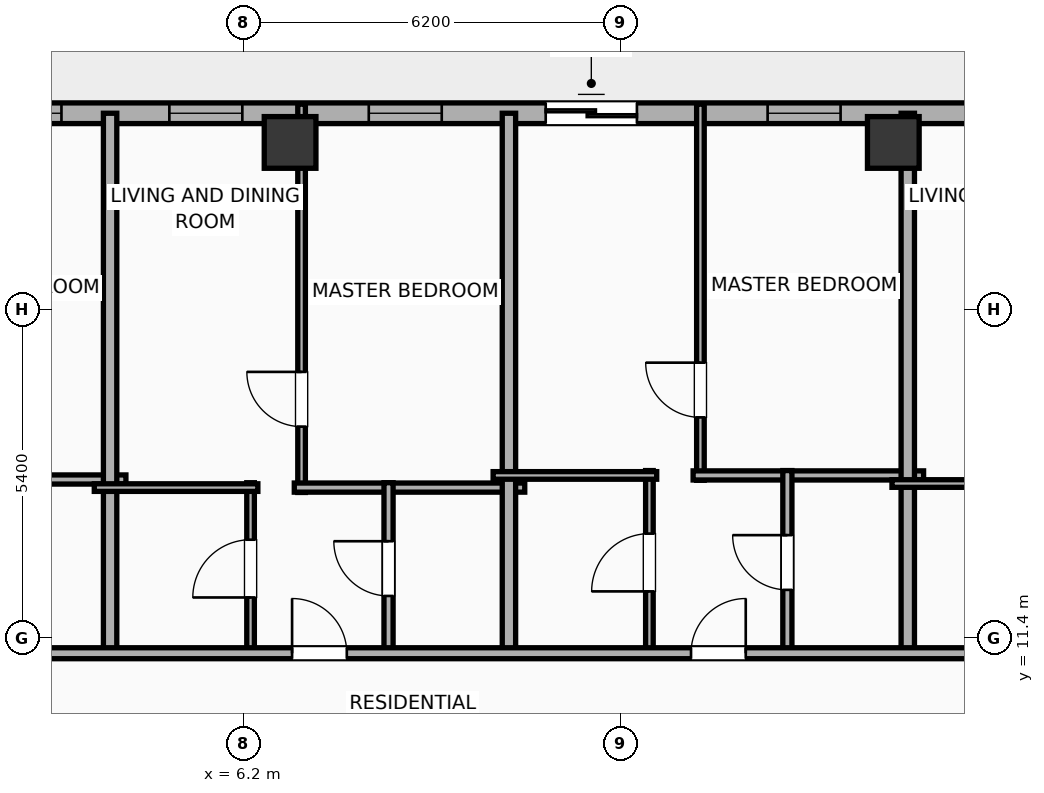
"""IFC4 building model, lengths in metres.
Left out: names, types, materials, properties, quantities, classifications, styles, units other than length and angle.
Written with IfcOpenShell. Run it as: python <this file> out.ifc"""

import sys

from ifc_helpers import new_model, si_unit, direction, frame, frame_2d, origin, origin_2d, place, context, subcontext, project, spatial, rectangle, hollow_rectangle, extrude, element, fill, save


model = new_model("IFC4")
c1 = context("Model", 3, precision=1e-05, world=origin(), true_north=direction((0.0, 1.0)))
c2 = subcontext(c1, "Body", "Model", "MODEL_VIEW")
j1 = project(units=[si_unit("LENGTHUNIT", "METRE"), si_unit("PLANEANGLEUNIT", "RADIAN")], contexts=[c1])
p1 = place(None, origin())
s1 = spatial("IfcSite", under=j1, at=p1, CompositionType="ELEMENT")
p2 = place(p1, origin())
s2 = spatial("IfcBuilding", under=s1, at=p2, CompositionType="ELEMENT")
p3 = place(p2, frame((0.0, 0.0, 231.4)))
s3 = spatial("IfcBuildingStorey", under=s2, at=p3, CompositionType="ELEMENT", Elevation=231.4)
for number, where, z_axis, x_axis in (
    (1, (16.88, 19.55, 0.0), (0.0, 0.0, 1.0), (1.0, 0.0, 0.0)),
    (2, (6.96, 19.55, 0.0), (0.0, 0.0, 1.0), (1.0, 0.0, 0.0)),
):
    element("IfcColumn", number, at=place(p3, frame(where, z_axis=z_axis, x_axis=x_axis)), inside=s3, PredefinedType="COLUMN", context=c2, shape_type="SweptSolid", body=[
        extrude(hollow_rectangle(XDim=0.85, YDim=0.85, WallThickness=0.028, at=origin_2d()), origin(), (0.0, 0.0, 1.0), 3.9),
    ])
p4 = place(p3, frame((-22.783, 20.03, 0.0), z_axis=(0.0, 0.0, 1.0), x_axis=(1.0, 0.0, 0.0)))
e3 = element("IfcWall", 3, at=p4, inside=s3, PredefinedType="ELEMENTEDWALL", context=c2, shape_type="SweptSolid", body=[
    extrude(rectangle(XDim=49.566, YDim=0.34, at=frame_2d((24.783, 0.0))), origin(), (0.0, 0.0, 1.0), 3.65),
])
p5 = place(p4, frame((14.12, 0.0, 0.0)))
e4 = element("IfcOpeningElement", 4, at=p5, cuts=e3, PredefinedType="OPENING", context=c2, shape_type="SweptSolid", body=[
    extrude(rectangle(XDim=1.5, YDim=2.05, at=frame_2d((0.75, 1.025))), frame((0.0, 0.18, 0.0), z_axis=(0.0, -1.0, 0.0), x_axis=(1.0, 0.0, 0.0)), (0.0, 0.0, 1.0), 0.36),
])
p6 = place(p4, frame((6.211, 0.0, 0.75)))
e5 = element("IfcOpeningElement", 5, at=p6, cuts=e3, PredefinedType="OPENING", context=c2, shape_type="SweptSolid", body=[
    extrude(rectangle(XDim=2.4, YDim=2.1, at=frame_2d((1.2, 1.05))), frame((0.0, 0.18, 0.0), z_axis=(0.0, -1.0, 0.0), x_axis=(1.0, 0.0, 0.0)), (0.0, 0.0, 1.0), 0.36),
])
p7 = place(p4, frame((23.583, 0.0, 0.75)))
e6 = element("IfcOpeningElement", 6, at=p7, cuts=e3, PredefinedType="OPENING", context=c2, shape_type="SweptSolid", body=[
    extrude(rectangle(XDim=2.4, YDim=2.1, at=frame_2d((1.2, 1.05))), frame((0.0, 0.18, 0.0), z_axis=(0.0, -1.0, 0.0), x_axis=(1.0, 0.0, 0.0)), (0.0, 0.0, 1.0), 0.36),
])
p8 = place(p4, frame((33.947, 0.0, 0.0)))
e7 = element("IfcOpeningElement", 7, at=p8, cuts=e3, PredefinedType="OPENING", context=c2, shape_type="SweptSolid", body=[
    extrude(rectangle(XDim=1.5, YDim=2.05, at=frame_2d((0.75, 1.025))), frame((0.0, 0.18, 0.0), z_axis=(0.0, -1.0, 0.0), x_axis=(1.0, 0.0, 0.0)), (0.0, 0.0, 1.0), 0.36),
])
p9 = place(p4, frame((2.36, 0.0, 0.75)))
e8 = element("IfcOpeningElement", 8, at=p9, cuts=e3, PredefinedType="OPENING", context=c2, shape_type="SweptSolid", body=[
    extrude(rectangle(XDim=1.2, YDim=2.05, at=frame_2d((0.6, 1.025))), frame((0.0, 0.18, 0.0), z_axis=(0.0, -1.0, 0.0), x_axis=(1.0, 0.0, 0.0)), (0.0, 0.0, 1.0), 0.36),
])
p10 = place(p4, frame((10.598, 0.0, 0.75)))
e9 = element("IfcOpeningElement", 9, at=p10, cuts=e3, PredefinedType="OPENING", context=c2, shape_type="SweptSolid", body=[
    extrude(rectangle(XDim=1.2, YDim=2.05, at=frame_2d((0.6, 1.025))), frame((0.0, 0.18, 0.0), z_axis=(0.0, -1.0, 0.0), x_axis=(1.0, 0.0, 0.0)), (0.0, 0.0, 1.0), 0.36),
])
p11 = place(p4, frame((17.478, 0.0, 0.75)))
e10 = element("IfcOpeningElement", 10, at=p11, cuts=e3, PredefinedType="OPENING", context=c2, shape_type="SweptSolid", body=[
    extrude(rectangle(XDim=1.2, YDim=2.05, at=frame_2d((0.6, 1.025))), frame((0.0, 0.18, 0.0), z_axis=(0.0, -1.0, 0.0), x_axis=(1.0, 0.0, 0.0)), (0.0, 0.0, 1.0), 0.36),
])
p12 = place(p4, frame((20.978, 0.0, 0.75)))
e11 = element("IfcOpeningElement", 11, at=p12, cuts=e3, PredefinedType="OPENING", context=c2, shape_type="SweptSolid", body=[
    extrude(rectangle(XDim=1.2, YDim=2.05, at=frame_2d((0.6, 1.025))), frame((0.0, 0.18, 0.0), z_axis=(0.0, -1.0, 0.0), x_axis=(1.0, 0.0, 0.0)), (0.0, 0.0, 1.0), 0.36),
])
p13 = place(p4, frame((27.758, 0.0, 0.75)))
e12 = element("IfcOpeningElement", 12, at=p13, cuts=e3, PredefinedType="OPENING", context=c2, shape_type="SweptSolid", body=[
    extrude(rectangle(XDim=1.2, YDim=2.05, at=frame_2d((0.6, 1.025))), frame((0.0, 0.18, 0.0), z_axis=(0.0, -1.0, 0.0), x_axis=(1.0, 0.0, 0.0)), (0.0, 0.0, 1.0), 0.36),
])
p14 = place(p4, frame((31.037, 0.0, 0.75)))
e13 = element("IfcOpeningElement", 13, at=p14, cuts=e3, PredefinedType="OPENING", context=c2, shape_type="SweptSolid", body=[
    extrude(rectangle(XDim=1.2, YDim=2.05, at=frame_2d((0.6, 1.025))), frame((0.0, 0.18, 0.0), z_axis=(0.0, -1.0, 0.0), x_axis=(1.0, 0.0, 0.0)), (0.0, 0.0, 1.0), 0.36),
])
p15 = place(p4, frame((37.596, 0.0, 0.75)))
e14 = element("IfcOpeningElement", 14, at=p15, cuts=e3, PredefinedType="OPENING", context=c2, shape_type="SweptSolid", body=[
    extrude(rectangle(XDim=1.2, YDim=2.05, at=frame_2d((0.6, 1.025))), frame((0.0, 0.18, 0.0), z_axis=(0.0, -1.0, 0.0), x_axis=(1.0, 0.0, 0.0)), (0.0, 0.0, 1.0), 0.36),
])
p16 = place(p4, frame((40.876, 0.0, 0.75)))
e15 = element("IfcOpeningElement", 15, at=p16, cuts=e3, PredefinedType="OPENING", context=c2, shape_type="SweptSolid", body=[
    extrude(rectangle(XDim=1.2, YDim=2.05, at=frame_2d((0.6, 1.025))), frame((0.0, 0.18, 0.0), z_axis=(0.0, -1.0, 0.0), x_axis=(1.0, 0.0, 0.0)), (0.0, 0.0, 1.0), 0.36),
])
p17 = place(p4, frame((44.156, 0.0, 0.75)))
e16 = element("IfcOpeningElement", 16, at=p17, cuts=e3, PredefinedType="OPENING", context=c2, shape_type="SweptSolid", body=[
    extrude(rectangle(XDim=1.2, YDim=2.05, at=frame_2d((0.6, 1.025))), frame((0.0, 0.18, 0.0), z_axis=(0.0, -1.0, 0.0), x_axis=(1.0, 0.0, 0.0)), (0.0, 0.0, 1.0), 0.36),
])
p18 = place(p4, frame((46.969, 0.0, 0.75)))
e17 = element("IfcOpeningElement", 17, at=p18, cuts=e3, PredefinedType="OPENING", context=c2, shape_type="SweptSolid", body=[
    extrude(rectangle(XDim=1.2, YDim=2.05, at=frame_2d((0.6, 1.025))), frame((0.0, 0.18, 0.0), z_axis=(0.0, -1.0, 0.0), x_axis=(1.0, 0.0, 0.0)), (0.0, 0.0, 1.0), 0.36),
])
p19 = place(p3, frame((0.47, 14.007, 0.0), z_axis=(0.0, 0.0, 1.0), x_axis=(1.0, 0.0, 0.0)))
e18 = element("IfcWall", 18, at=p19, inside=s3, PredefinedType="PLUMBINGWALL", context=c2, shape_type="SweptSolid", body=[
    extrude(rectangle(XDim=3.79, YDim=0.15, at=frame_2d((1.895, 0.0))), origin(), (0.0, 0.0, 1.0), 3.65),
])
p20 = place(p3, frame((4.0, 11.07, 0.0), z_axis=(0.0, 0.0, 1.0), x_axis=(0.0, 1.0, 0.0)))
e19 = element("IfcWall", 19, at=p20, inside=s3, PredefinedType="PARTITIONING", context=c2, shape_type="SweptSolid", body=[
    extrude(rectangle(XDim=8.96, YDim=0.22, at=frame_2d((4.48, 0.0))), origin(), (0.0, 0.0, 1.0), 3.65),
])
p21 = place(p3, frame((7.149, 13.794, 0.0), z_axis=(0.0, 0.0, 1.0), x_axis=(0.0, 1.0, 0.0)))
e20 = element("IfcWall", 20, at=p21, inside=s3, PredefinedType="PARTITIONING", context=c2, shape_type="SweptSolid", body=[
    extrude(rectangle(XDim=6.386, YDim=0.125, at=frame_2d((3.193, 0.0))), origin(), (0.0, 0.0, 1.0), 3.65),
])
p22 = place(p21, frame((1.083, 0.0, 0.0)))
e21 = element("IfcOpeningElement", 21, at=p22, cuts=e20, PredefinedType="OPENING", context=c2, shape_type="SweptSolid", body=[
    extrude(rectangle(XDim=0.9, YDim=2.05, at=frame_2d((0.45, 1.025))), frame((0.0, 0.073, 0.0), z_axis=(0.0, -1.0, 0.0), x_axis=(1.0, 0.0, 0.0)), (0.0, 0.0, 1.0), 0.145),
])
p23 = place(p3, frame((7.029, 13.874, 0.0), z_axis=(0.0, 0.0, 1.0), x_axis=(1.0, 0.0, 0.0)))
e22 = element("IfcWall", 22, at=p23, inside=s3, PredefinedType="PLUMBINGWALL", context=c2, shape_type="SweptSolid", body=[
    extrude(rectangle(XDim=3.79, YDim=0.15, at=frame_2d((1.895, 0.0))), origin(), (0.0, 0.0, 1.0), 3.65),
])
p24 = place(p3, frame((6.31, 11.13, 0.0), z_axis=(0.0, 0.0, 1.0), x_axis=(0.0, 1.0, 0.0)))
e23 = element("IfcWall", 23, at=p24, inside=s3, PredefinedType="PARTITIONING", context=c2, shape_type="SweptSolid", body=[
    extrude(rectangle(XDim=2.824, YDim=0.125, at=frame_2d((1.412, 0.0))), origin(), (0.0, 0.0, 1.0), 3.65),
])
p25 = place(p24, frame((0.937, 0.0, 0.0)))
e24 = element("IfcOpeningElement", 24, at=p25, cuts=e23, PredefinedType="OPENING", context=c2, shape_type="SweptSolid", body=[
    extrude(rectangle(XDim=0.95, YDim=2.05, at=frame_2d((0.475, 1.025))), frame((0.0, 0.073, 0.0), z_axis=(0.0, -1.0, 0.0), x_axis=(1.0, 0.0, 0.0)), (0.0, 0.0, 1.0), 0.145),
])
p26 = place(p3, frame((3.74, 13.874, 0.0), z_axis=(0.0, 0.0, 1.0), x_axis=(1.0, 0.0, 0.0)))
e25 = element("IfcWall", 25, at=p26, inside=s3, PredefinedType="PARTITIONING", context=c2, shape_type="SweptSolid", body=[
    extrude(rectangle(XDim=2.69, YDim=0.125, at=frame_2d((1.345, 0.0))), origin(), (0.0, 0.0, 1.0), 3.65),
])
p27 = place(p3, frame((8.579, 11.13, 0.0), z_axis=(0.0, 0.0, 1.0), x_axis=(0.0, 1.0, 0.0)))
e26 = element("IfcWall", 26, at=p27, inside=s3, PredefinedType="PLUMBINGWALL", context=c2, shape_type="SweptSolid", body=[
    extrude(rectangle(XDim=2.824, YDim=0.15, at=frame_2d((1.412, 0.0))), origin(), (0.0, 0.0, 1.0), 3.65),
])
p28 = place(p27, frame((0.962, 0.0, 0.0)))
e27 = element("IfcOpeningElement", 27, at=p28, cuts=e26, PredefinedType="OPENING", context=c2, shape_type="SweptSolid", body=[
    extrude(rectangle(XDim=0.9, YDim=2.05, at=frame_2d((0.45, 1.025))), frame((0.0, 0.085, 0.0), z_axis=(0.0, -1.0, 0.0), x_axis=(1.0, 0.0, 0.0)), (0.0, 0.0, 1.0), 0.17),
])
p29 = place(p3, frame((10.559, 11.07, 0.0), z_axis=(0.0, 0.0, 1.0), x_axis=(0.0, 1.0, 0.0)))
e28 = element("IfcWall", 28, at=p29, inside=s3, PredefinedType="PARTITIONING", context=c2, shape_type="SweptSolid", body=[
    extrude(rectangle(XDim=8.96, YDim=0.22, at=frame_2d((4.48, 0.0))), origin(), (0.0, 0.0, 1.0), 3.65),
])
p30 = place(p3, frame((13.708, 13.994, 0.0), z_axis=(0.0, 0.0, 1.0), x_axis=(0.0, 1.0, 0.0)))
e29 = element("IfcWall", 29, at=p30, inside=s3, PredefinedType="PARTITIONING", context=c2, shape_type="SweptSolid", body=[
    extrude(rectangle(XDim=6.186, YDim=0.125, at=frame_2d((3.093, 0.0))), origin(), (0.0, 0.0, 1.0), 3.65),
])
p31 = place(p30, frame((1.035, 0.0, 0.0)))
e30 = element("IfcOpeningElement", 30, at=p31, cuts=e29, PredefinedType="OPENING", context=c2, shape_type="SweptSolid", body=[
    extrude(rectangle(XDim=0.9, YDim=2.05, at=frame_2d((0.45, 1.025))), frame((0.0, 0.073, 0.0), z_axis=(0.0, -1.0, 0.0), x_axis=(1.0, 0.0, 0.0)), (0.0, 0.0, 1.0), 0.145),
])
p32 = place(p3, frame((13.588, 14.074, 0.0), z_axis=(0.0, 0.0, 1.0), x_axis=(1.0, 0.0, 0.0)))
e31 = element("IfcWall", 31, at=p32, inside=s3, PredefinedType="PLUMBINGWALL", context=c2, shape_type="SweptSolid", body=[
    extrude(rectangle(XDim=3.79, YDim=0.15, at=frame_2d((1.895, 0.0))), origin(), (0.0, 0.0, 1.0), 3.65),
])
p33 = place(p3, frame((12.869, 11.13, 0.0), z_axis=(0.0, 0.0, 1.0), x_axis=(0.0, 1.0, 0.0)))
e32 = element("IfcWall", 32, at=p33, inside=s3, PredefinedType="PARTITIONING", context=c2, shape_type="SweptSolid", body=[
    extrude(rectangle(XDim=3.024, YDim=0.125, at=frame_2d((1.512, 0.0))), origin(), (0.0, 0.0, 1.0), 3.65),
])
p34 = place(p33, frame((1.037, 0.0, 0.0)))
e33 = element("IfcOpeningElement", 33, at=p34, cuts=e32, PredefinedType="OPENING", context=c2, shape_type="SweptSolid", body=[
    extrude(rectangle(XDim=0.95, YDim=2.05, at=frame_2d((0.475, 1.025))), frame((0.0, 0.073, 0.0), z_axis=(0.0, -1.0, 0.0), x_axis=(1.0, 0.0, 0.0)), (0.0, 0.0, 1.0), 0.145),
])
p35 = place(p3, frame((10.299, 14.074, 0.0), z_axis=(0.0, 0.0, 1.0), x_axis=(1.0, 0.0, 0.0)))
e34 = element("IfcWall", 34, at=p35, inside=s3, PredefinedType="PARTITIONING", context=c2, shape_type="SweptSolid", body=[
    extrude(rectangle(XDim=2.69, YDim=0.125, at=frame_2d((1.345, 0.0))), origin(), (0.0, 0.0, 1.0), 3.65),
])
p36 = place(p3, frame((15.138, 11.13, 0.0), z_axis=(0.0, 0.0, 1.0), x_axis=(0.0, 1.0, 0.0)))
e35 = element("IfcWall", 35, at=p36, inside=s3, PredefinedType="PLUMBINGWALL", context=c2, shape_type="SweptSolid", body=[
    extrude(rectangle(XDim=3.024, YDim=0.15, at=frame_2d((1.512, 0.0))), origin(), (0.0, 0.0, 1.0), 3.65),
])
p37 = place(p36, frame((1.062, 0.0, 0.0)))
e36 = element("IfcOpeningElement", 36, at=p37, cuts=e35, PredefinedType="OPENING", context=c2, shape_type="SweptSolid", body=[
    extrude(rectangle(XDim=0.9, YDim=2.05, at=frame_2d((0.45, 1.025))), frame((0.0, 0.085, 0.0), z_axis=(0.0, -1.0, 0.0), x_axis=(1.0, 0.0, 0.0)), (0.0, 0.0, 1.0), 0.17),
])
p38 = place(p3, frame((17.118, 11.07, 0.0), z_axis=(0.0, 0.0, 1.0), x_axis=(0.0, 1.0, 0.0)))
e37 = element("IfcWall", 37, at=p38, inside=s3, PredefinedType="PARTITIONING", context=c2, shape_type="SweptSolid", body=[
    extrude(rectangle(XDim=8.96, YDim=0.22, at=frame_2d((4.48, 0.0))), origin(), (0.0, 0.0, 1.0), 3.65),
])
p39 = place(p3, frame((16.858, 13.941, 0.0), z_axis=(0.0, 0.0, 1.0), x_axis=(1.0, 0.0, 0.0)))
e38 = element("IfcWall", 38, at=p39, inside=s3, PredefinedType="PARTITIONING", context=c2, shape_type="SweptSolid", body=[
    extrude(rectangle(XDim=2.69, YDim=0.125, at=frame_2d((1.345, 0.0))), origin(), (0.0, 0.0, 1.0), 3.65),
])
p40 = place(p3, frame((-26.23, 11.15, 0.0), z_axis=(0.0, 0.0, 1.0), x_axis=(1.0, 0.0, 0.0)))
e39 = element("IfcWall", 39, at=p40, inside=s3, PredefinedType="PARTITIONING", context=c2, shape_type="SweptSolid", body=[
    extrude(rectangle(XDim=56.46, YDim=0.18, at=frame_2d((28.23, 0.0))), origin(), (0.0, 0.0, 1.0), 3.65),
])
p41 = place(p40, frame((3.614, 0.0, 0.0)))
e40 = element("IfcOpeningElement", 40, at=p41, cuts=e39, PredefinedType="OPENING", context=c2, shape_type="SweptSolid", body=[
    extrude(rectangle(XDim=1.15, YDim=2.05, at=frame_2d((0.575, 1.025))), frame((0.0, 0.1, 0.0), z_axis=(0.0, -1.0, 0.0), x_axis=(1.0, 0.0, 0.0)), (0.0, 0.0, 1.0), 0.2),
])
p42 = place(p40, frame((11.761, 0.0, 0.0)))
e41 = element("IfcOpeningElement", 41, at=p42, cuts=e39, PredefinedType="OPENING", context=c2, shape_type="SweptSolid", body=[
    extrude(rectangle(XDim=1.15, YDim=2.05, at=frame_2d((0.575, 1.025))), frame((0.0, 0.1, 0.0), z_axis=(0.0, -1.0, 0.0), x_axis=(1.0, 0.0, 0.0)), (0.0, 0.0, 1.0), 0.2),
])
p43 = place(p40, frame((19.447, 0.0, 0.0)))
e42 = element("IfcOpeningElement", 42, at=p43, cuts=e39, PredefinedType="OPENING", context=c2, shape_type="SweptSolid", body=[
    extrude(rectangle(XDim=0.9, YDim=2.05, at=frame_2d((0.45, 1.025))), frame((0.0, 0.1, 0.0), z_axis=(0.0, -1.0, 0.0), x_axis=(1.0, 0.0, 0.0)), (0.0, 0.0, 1.0), 0.2),
])
p44 = place(p40, frame((26.448, 0.0, 0.0)))
e43 = element("IfcOpeningElement", 43, at=p44, cuts=e39, PredefinedType="OPENING", context=c2, shape_type="SweptSolid", body=[
    extrude(rectangle(XDim=0.9, YDim=2.05, at=frame_2d((0.45, 1.025))), frame((0.0, 0.1, 0.0), z_axis=(0.0, -1.0, 0.0), x_axis=(1.0, 0.0, 0.0)), (0.0, 0.0, 1.0), 0.2),
])
p45 = place(p40, frame((33.223, 0.0, 0.0)))
e44 = element("IfcOpeningElement", 44, at=p45, cuts=e39, PredefinedType="OPENING", context=c2, shape_type="SweptSolid", body=[
    extrude(rectangle(XDim=0.9, YDim=2.05, at=frame_2d((0.45, 1.025))), frame((0.0, 0.1, 0.0), z_axis=(0.0, -1.0, 0.0), x_axis=(1.0, 0.0, 0.0)), (0.0, 0.0, 1.0), 0.2),
])
p46 = place(p40, frame((39.783, 0.0, 0.0)))
e45 = element("IfcOpeningElement", 45, at=p46, cuts=e39, PredefinedType="OPENING", context=c2, shape_type="SweptSolid", body=[
    extrude(rectangle(XDim=0.9, YDim=2.05, at=frame_2d((0.45, 1.025))), frame((0.0, 0.1, 0.0), z_axis=(0.0, -1.0, 0.0), x_axis=(1.0, 0.0, 0.0)), (0.0, 0.0, 1.0), 0.2),
])
p47 = place(p40, frame((46.344, 0.0, 0.0)))
e46 = element("IfcOpeningElement", 46, at=p47, cuts=e39, PredefinedType="OPENING", context=c2, shape_type="SweptSolid", body=[
    extrude(rectangle(XDim=0.9, YDim=2.05, at=frame_2d((0.45, 1.025))), frame((0.0, 0.1, 0.0), z_axis=(0.0, -1.0, 0.0), x_axis=(1.0, 0.0, 0.0)), (0.0, 0.0, 1.0), 0.2),
])
p48 = place(p40, frame((52.933, 0.0, 0.0)))
e47 = element("IfcOpeningElement", 47, at=p48, cuts=e39, PredefinedType="OPENING", context=c2, shape_type="SweptSolid", body=[
    extrude(rectangle(XDim=0.9, YDim=2.05, at=frame_2d((0.45, 1.025))), frame((0.0, 0.1, 0.0), z_axis=(0.0, -1.0, 0.0), x_axis=(1.0, 0.0, 0.0)), (0.0, 0.0, 1.0), 0.2),
])
p49 = place(p7, origin())
e48 = element("IfcWindow", 48, at=p49, inside=s3, PartitioningType="SINGLE_PANEL", PredefinedType="WINDOW", context=c2, shape_type="SweptSolid", body=[
    extrude(rectangle(XDim=2.4, YDim=2.1, at=frame_2d((1.2, 1.05))), frame((0.0, 0.03, 0.0), z_axis=(0.0, -1.0, 0.0), x_axis=(1.0, 0.0, 0.0)), (0.0, 0.0, 1.0), 0.06),
])
fill(e6, e48)
p50 = place(p8, origin())
e49 = element("IfcDoor", 49, at=p50, inside=s3, OperationType="SLIDING_TO_RIGHT", PredefinedType="DOOR", context=c2, shape_type="SweptSolid", body=[
    extrude(rectangle(XDim=1.5, YDim=2.05, at=frame_2d((0.75, 1.025))), frame((0.0, 0.025, 0.0), z_axis=(0.0, -1.0, 0.0), x_axis=(1.0, 0.0, 0.0)), (0.0, 0.0, 1.0), 0.05),
])
fill(e7, e49)
p51 = place(p13, origin())
e50 = element("IfcWindow", 50, at=p51, inside=s3, PartitioningType="SINGLE_PANEL", PredefinedType="WINDOW", context=c2, shape_type="SweptSolid", body=[
    extrude(rectangle(XDim=1.2, YDim=2.05, at=frame_2d((0.6, 1.025))), frame((0.0, 0.03, 0.0), z_axis=(0.0, -1.0, 0.0), x_axis=(1.0, 0.0, 0.0)), (0.0, 0.0, 1.0), 0.06),
])
fill(e12, e50)
p52 = place(p14, origin())
e51 = element("IfcWindow", 51, at=p52, inside=s3, PartitioningType="SINGLE_PANEL", PredefinedType="WINDOW", context=c2, shape_type="SweptSolid", body=[
    extrude(rectangle(XDim=1.2, YDim=2.05, at=frame_2d((0.6, 1.025))), frame((0.0, 0.03, 0.0), z_axis=(0.0, -1.0, 0.0), x_axis=(1.0, 0.0, 0.0)), (0.0, 0.0, 1.0), 0.06),
])
fill(e13, e51)
p53 = place(p15, origin())
e52 = element("IfcWindow", 52, at=p53, inside=s3, PartitioningType="SINGLE_PANEL", PredefinedType="WINDOW", context=c2, shape_type="SweptSolid", body=[
    extrude(rectangle(XDim=1.2, YDim=2.05, at=frame_2d((0.6, 1.025))), frame((0.0, 0.03, 0.0), z_axis=(0.0, -1.0, 0.0), x_axis=(1.0, 0.0, 0.0)), (0.0, 0.0, 1.0), 0.06),
])
fill(e14, e52)
p54 = place(p22, origin())
e53 = element("IfcDoor", 53, at=p54, inside=s3, OperationType="SINGLE_SWING_RIGHT", PredefinedType="DOOR", context=c2, shape_type="SweptSolid", body=[
    extrude(rectangle(XDim=0.9, YDim=2.05, at=frame_2d((0.45, 1.025))), frame((0.0, 0.025, 0.0), z_axis=(0.0, -1.0, 0.0), x_axis=(1.0, 0.0, 0.0)), (0.0, 0.0, 1.0), 0.05),
])
fill(e21, e53)
p55 = place(p25, origin())
e54 = element("IfcDoor", 54, at=p55, inside=s3, OperationType="SINGLE_SWING_LEFT", PredefinedType="DOOR", context=c2, shape_type="SweptSolid", body=[
    extrude(rectangle(XDim=0.95, YDim=2.05, at=frame_2d((0.475, 1.025))), frame((0.0, 0.025, 0.0), z_axis=(0.0, -1.0, 0.0), x_axis=(1.0, 0.0, 0.0)), (0.0, 0.0, 1.0), 0.05),
])
fill(e24, e54)
p56 = place(p28, origin())
e55 = element("IfcDoor", 55, at=p56, inside=s3, OperationType="SINGLE_SWING_RIGHT", PredefinedType="DOOR", context=c2, shape_type="SweptSolid", body=[
    extrude(rectangle(XDim=0.9, YDim=2.05, at=frame_2d((0.45, 1.025))), frame((0.0, 0.025, 0.0), z_axis=(0.0, -1.0, 0.0), x_axis=(1.0, 0.0, 0.0)), (0.0, 0.0, 1.0), 0.05),
])
fill(e27, e55)
p57 = place(p31, origin())
e56 = element("IfcDoor", 56, at=p57, inside=s3, OperationType="SINGLE_SWING_RIGHT", PredefinedType="DOOR", context=c2, shape_type="SweptSolid", body=[
    extrude(rectangle(XDim=0.9, YDim=2.05, at=frame_2d((0.45, 1.025))), frame((0.0, 0.025, 0.0), z_axis=(0.0, -1.0, 0.0), x_axis=(1.0, 0.0, 0.0)), (0.0, 0.0, 1.0), 0.05),
])
fill(e30, e56)
p58 = place(p34, origin())
e57 = element("IfcDoor", 57, at=p58, inside=s3, OperationType="SINGLE_SWING_LEFT", PredefinedType="DOOR", context=c2, shape_type="SweptSolid", body=[
    extrude(rectangle(XDim=0.95, YDim=2.05, at=frame_2d((0.475, 1.025))), frame((0.0, 0.025, 0.0), z_axis=(0.0, -1.0, 0.0), x_axis=(1.0, 0.0, 0.0)), (0.0, 0.0, 1.0), 0.05),
])
fill(e33, e57)
p59 = place(p37, origin())
e58 = element("IfcDoor", 58, at=p59, inside=s3, OperationType="SINGLE_SWING_RIGHT", PredefinedType="DOOR", context=c2, shape_type="SweptSolid", body=[
    extrude(rectangle(XDim=0.9, YDim=2.05, at=frame_2d((0.45, 1.025))), frame((0.0, 0.025, 0.0), z_axis=(0.0, -1.0, 0.0), x_axis=(1.0, 0.0, 0.0)), (0.0, 0.0, 1.0), 0.05),
])
fill(e36, e58)
p60 = place(p45, origin())
e59 = element("IfcDoor", 59, at=p60, inside=s3, OperationType="SINGLE_SWING_LEFT", PredefinedType="DOOR", context=c2, shape_type="SweptSolid", body=[
    extrude(rectangle(XDim=0.9, YDim=2.05, at=frame_2d((0.45, 1.025))), frame((0.0, 0.025, 0.0), z_axis=(0.0, -1.0, 0.0), x_axis=(1.0, 0.0, 0.0)), (0.0, 0.0, 1.0), 0.05),
])
fill(e44, e59)
p61 = place(p46, origin())
e60 = element("IfcDoor", 60, at=p61, inside=s3, OperationType="SINGLE_SWING_RIGHT", PredefinedType="DOOR", context=c2, shape_type="SweptSolid", body=[
    extrude(rectangle(XDim=0.9, YDim=2.05, at=frame_2d((0.45, 1.025))), frame((0.0, 0.025, 0.0), z_axis=(0.0, -1.0, 0.0), x_axis=(1.0, 0.0, 0.0)), (0.0, 0.0, 1.0), 0.05),
])
fill(e45, e60)
save(model, sys.argv[1])
